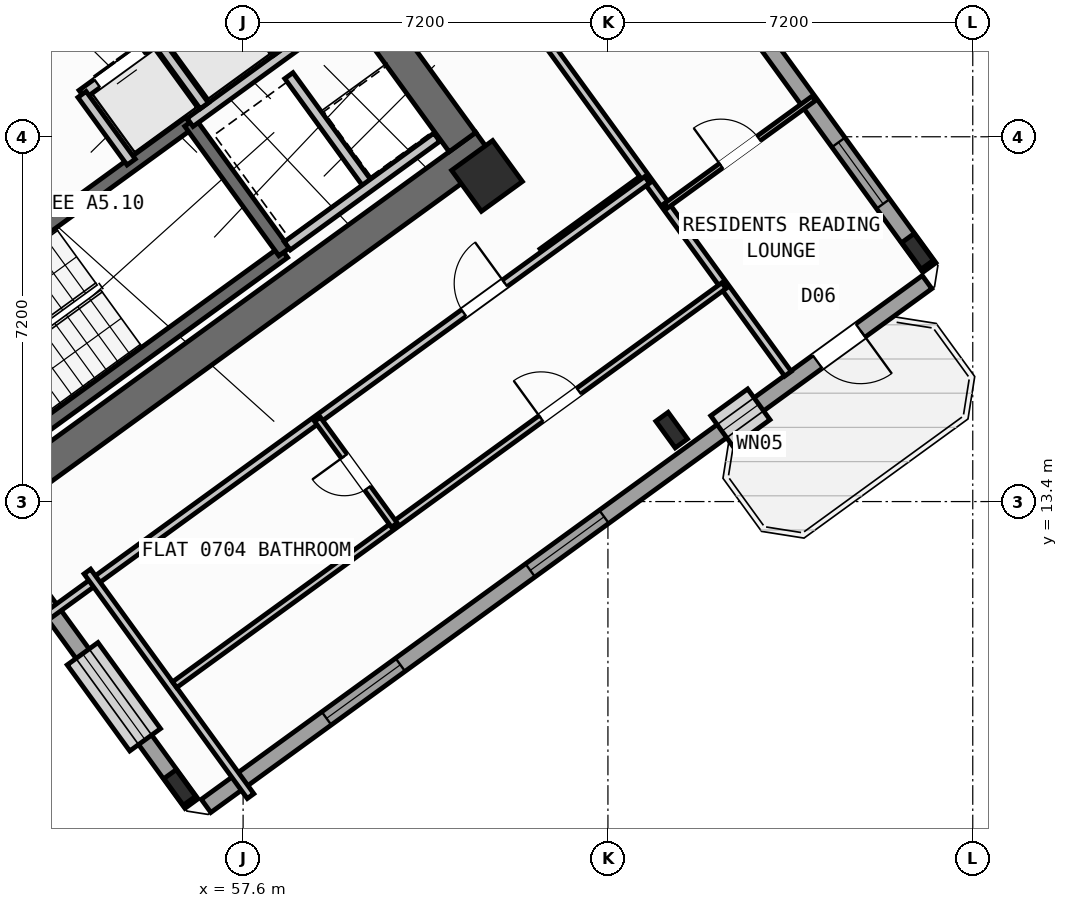
"""IFC4 building model, lengths in metres.
Left out: names, types, materials, properties, quantities, classifications, styles, units other than length and angle.
Written with IfcOpenShell. Run it as: python <this file> out.ifc"""

import sys

from ifc_helpers import new_model, si_unit, direction, frame, frame_2d, origin, origin_2d, place, context, subcontext, project, spatial, rectangle, hollow_rectangle, i_section, extrude, source, transform, mapped, element, fill, save


model = new_model("IFC4")
c1 = context("Model", 3, precision=1e-05, world=origin(), true_north=direction((0.0, 1.0)))
c2 = subcontext(c1, "Body", "Model", "MODEL_VIEW")
j1 = project(units=[si_unit("LENGTHUNIT", "METRE"), si_unit("PLANEANGLEUNIT", "RADIAN")], contexts=[c1])
p1 = place(None, origin())
s1 = spatial("IfcSite", under=j1, at=p1, CompositionType="ELEMENT")
p2 = place(p1, origin())
s2 = spatial("IfcBuilding", under=s1, at=p2, CompositionType="ELEMENT")
p3 = place(p2, frame((0.0, 0.0, 31.2)))
s3 = spatial("IfcBuildingStorey", under=s2, at=p3, CompositionType="ELEMENT", Elevation=31.2)
p4 = place(p3, frame((52.318, 13.11, 0.0), z_axis=(0.0, 0.0, 1.0), x_axis=(0.809019445368, 0.587781878776, 0.0)))
e1 = element("IfcWall", 1, at=p4, inside=s3, PredefinedType="SHEAR", context=c2, shape_type="SweptSolid", body=[
    extrude(rectangle(XDim=12.44, YDim=0.65, at=frame_2d((6.22, 0.0))), origin(), (0.0, 0.0, 1.0), 3.35),
])
p5 = place(p3, frame((61.929, 20.494, 0.0), z_axis=(0.0, 0.0, 1.0), x_axis=(-0.58782982593, 0.808984607855, 0.0)))
e2 = element("IfcWall", 2, at=p5, inside=s3, PredefinedType="SHEAR", context=c2, shape_type="SweptSolid", body=[
    extrude(rectangle(XDim=3.525, YDim=0.65, at=frame_2d((1.762, 0.0))), origin(), (0.0, 0.0, 1.0), 3.35),
])
m1 = source(origin(), c2, "Body", "SweptSolid", [
    extrude(i_section(OverallWidth=0.3, OverallDepth=0.65, WebThickness=0.016, FlangeThickness=0.031, at=origin_2d()), origin(), (0.0, 0.0, 1.0), 3.6),
])
for number, where, z_axis, x_axis in (
    (3, (56.35, 7.758, 0.0), (0.0, 0.0, 1.0), (0.809, 0.588, 0.0)),
    (4, (66.058, 14.811, 0.0), (0.0, 0.0, 1.0), (0.809, 0.588, 0.0)),
):
    element("IfcColumn", number, at=place(p3, frame(where, z_axis=z_axis, x_axis=x_axis)), inside=s3, PredefinedType="COLUMN", context=c2, shape_type="MappedRepresentation", body=[
        mapped(m1, transform((0.0, 0.0, 0.0), scale=1.0)),
    ])
m2 = source(origin(), c2, "Body", "SweptSolid", [
    extrude(hollow_rectangle(XDim=1.0, YDim=1.0, WallThickness=0.04, at=origin_2d()), origin(), (0.0, 0.0, 1.0), 3.6),
])
p6 = place(p3, frame((62.414, 19.827, 0.0), z_axis=(0.0, 0.0, 1.0), x_axis=(0.809016994375, 0.587785252292, 0.0)))
e5 = element("IfcColumn", 5, at=p6, inside=s3, PredefinedType="COLUMN", context=c2, shape_type="MappedRepresentation", body=[
    mapped(m2, transform((0.0, 0.0, 0.0), scale=1.0)),
])
p7 = place(p3, frame((70.912, 18.338, 0.0), z_axis=(0.0, 0.0, 1.0), x_axis=(0.809016994375, 0.587785252292, 0.0)))
e6 = element("IfcColumn", 6, at=p7, inside=s3, PredefinedType="COLUMN", context=c2, shape_type="MappedRepresentation", body=[
    mapped(m1, transform((0.0, 0.0, 0.0), scale=1.0)),
])
p8 = place(p3, frame((58.455, 35.484, 0.0), z_axis=(0.0, 0.0, 1.0), x_axis=(0.587783625747, -0.809018176127, 0.0)))
e7 = element("IfcWall", 7, at=p8, inside=s3, PredefinedType="STANDARD", context=c2, shape_type="SweptSolid", body=[
    extrude(rectangle(XDim=21.587, YDim=0.32, at=frame_2d((10.794, 0.0))), origin(), (0.0, 0.0, 1.0), 2.725),
])
p9 = place(p8, frame((2.994, 0.0, 0.8)))
e8 = element("IfcOpeningElement", 8, at=p9, cuts=e7, PredefinedType="OPENING", context=c2, shape_type="SweptSolid", body=[
    extrude(rectangle(XDim=2.1, YDim=1.55, at=frame_2d((1.05, 0.775))), frame((0.0, 0.17, 0.0), z_axis=(0.0, -1.0, 0.0), x_axis=(1.0, 0.0, 0.0)), (0.0, 0.0, 1.0), 0.34),
])
p10 = place(p8, frame((11.934, 0.0, 0.85)))
e9 = element("IfcOpeningElement", 9, at=p10, cuts=e7, PredefinedType="OPENING", context=c2, shape_type="SweptSolid", body=[
    extrude(rectangle(XDim=1.8, YDim=1.5, at=frame_2d((0.9, 0.75))), frame((0.0, 0.17, 0.0), z_axis=(0.0, -1.0, 0.0), x_axis=(1.0, 0.0, 0.0)), (0.0, 0.0, 1.0), 0.34),
])
p11 = place(p8, frame((18.535, 0.0, 0.85)))
e10 = element("IfcOpeningElement", 10, at=p11, cuts=e7, PredefinedType="OPENING", context=c2, shape_type="SweptSolid", body=[
    extrude(rectangle(XDim=1.5, YDim=1.5, at=frame_2d((0.75, 0.75))), frame((0.0, 0.17, 0.0), z_axis=(0.0, -1.0, 0.0), x_axis=(1.0, 0.0, 0.0)), (0.0, 0.0, 1.0), 0.34),
])
p12 = place(p3, frame((71.098, 17.731, 0.0), z_axis=(0.0, 0.0, 1.0), x_axis=(-0.809021120468, -0.587779573171, 0.0)))
e11 = element("IfcWall", 11, at=p12, inside=s3, PredefinedType="STANDARD", context=c2, shape_type="SweptSolid", body=[
    extrude(rectangle(XDim=17.588, YDim=0.32, at=frame_2d((8.794, 0.0))), origin(), (0.0, 0.0, 1.0), 3.35),
])
p13 = place(p12, frame((1.624, 0.0, 0.0)))
e12 = element("IfcOpeningElement", 12, at=p13, cuts=e11, PredefinedType="OPENING", context=c2, shape_type="SweptSolid", body=[
    extrude(rectangle(XDim=1.05, YDim=2.15, at=frame_2d((0.525, 1.075))), frame((0.0, 0.17, 0.0), z_axis=(0.0, -1.0, 0.0), x_axis=(1.0, 0.0, 0.0)), (0.0, 0.0, 1.0), 0.34),
])
p14 = place(p12, frame((4.104, 0.0, 1.0)))
e13 = element("IfcOpeningElement", 13, at=p14, cuts=e11, PredefinedType="OPENING", context=c2, shape_type="SweptSolid", body=[
    extrude(rectangle(XDim=0.9, YDim=1.25, at=frame_2d((0.45, 0.625))), frame((0.0, 0.17, 0.0), z_axis=(0.0, -1.0, 0.0), x_axis=(1.0, 0.0, 0.0)), (0.0, 0.0, 1.0), 0.34),
])
p15 = place(p12, frame((7.879, 0.0, 0.85)))
e14 = element("IfcOpeningElement", 14, at=p15, cuts=e11, PredefinedType="OPENING", context=c2, shape_type="SweptSolid", body=[
    extrude(rectangle(XDim=1.8, YDim=1.5, at=frame_2d((0.9, 0.75))), frame((0.0, 0.17, 0.0), z_axis=(0.0, -1.0, 0.0), x_axis=(1.0, 0.0, 0.0)), (0.0, 0.0, 1.0), 0.34),
])
p16 = place(p12, frame((12.849, 0.0, 0.85)))
e15 = element("IfcOpeningElement", 15, at=p16, cuts=e11, PredefinedType="OPENING", context=c2, shape_type="SweptSolid", body=[
    extrude(rectangle(XDim=1.8, YDim=1.5, at=frame_2d((0.9, 0.75))), frame((0.0, 0.17, 0.0), z_axis=(0.0, -1.0, 0.0), x_axis=(1.0, 0.0, 0.0)), (0.0, 0.0, 1.0), 0.34),
])
p17 = place(p3, frame((56.581, 7.439, 0.0), z_axis=(0.0, 0.0, 1.0), x_axis=(-0.587785875463, 0.809016541614, 0.0)))
e16 = element("IfcWall", 16, at=p17, inside=s3, PredefinedType="STANDARD", context=c2, shape_type="SweptSolid", body=[
    extrude(rectangle(XDim=6.774, YDim=0.32, at=frame_2d((3.387, 0.0))), origin(), (0.0, 0.0, 1.0), 2.725),
])
p18 = place(p17, frame((1.556, 0.0, 0.8)))
e17 = element("IfcOpeningElement", 17, at=p18, cuts=e16, PredefinedType="OPENING", context=c2, shape_type="SweptSolid", body=[
    extrude(rectangle(XDim=2.1, YDim=1.55, at=frame_2d((1.05, 0.775))), frame((0.0, 0.17, 0.0), z_axis=(0.0, -1.0, 0.0), x_axis=(1.0, 0.0, 0.0)), (0.0, 0.0, 1.0), 0.34),
])
p19 = place(p3, frame((52.472, 14.013, 0.0), z_axis=(0.0, 0.0, 1.0), x_axis=(0.809028366311, 0.587769599847, 0.0)))
e18 = element("IfcWall", 18, at=p19, inside=s3, PredefinedType="SHEAR", context=c2, shape_type="SweptSolid", body=[
    extrude(rectangle(XDim=7.33, YDim=0.26, at=frame_2d((3.665, 0.0))), origin(), (0.0, 0.0, 1.0), 3.35),
])
p20 = place(p3, frame((50.615, 16.57, 0.0), z_axis=(0.0, 0.0, 1.0), x_axis=(0.809028366311, 0.587769599847, 0.0)))
e19 = element("IfcWall", 19, at=p20, inside=s3, PredefinedType="SHEAR", context=c2, shape_type="SweptSolid", body=[
    extrude(rectangle(XDim=7.33, YDim=0.26, at=frame_2d((3.665, 0.0))), origin(), (0.0, 0.0, 1.0), 3.35),
])
p21 = place(p20, frame((0.22, 0.0, 0.0)))
e20 = element("IfcOpeningElement", 20, at=p21, cuts=e19, PredefinedType="OPENING", context=c2, shape_type="SweptSolid", body=[
    extrude(rectangle(XDim=1.1, YDim=2.1, at=frame_2d((0.55, 1.05))), frame((0.0, 0.14, 0.0), z_axis=(0.0, -1.0, 0.0), x_axis=(1.0, 0.0, 0.0)), (0.0, 0.0, 1.0), 0.28),
])
p22 = place(p3, frame((58.41, 18.327, 0.0), z_axis=(0.0, 0.0, 1.0), x_axis=(-0.58776738483, 0.809029975545, 0.0)))
e21 = element("IfcWall", 21, at=p22, inside=s3, PredefinedType="SHEAR", context=c2, shape_type="SweptSolid", body=[
    extrude(rectangle(XDim=3.16, YDim=0.26, at=frame_2d((1.58, 0.0))), origin(), (0.0, 0.0, 1.0), 3.35),
])
p23 = place(p3, frame((56.553, 20.884, 0.0), z_axis=(0.0, 0.0, 1.0), x_axis=(0.809035789462, 0.587759382205, 0.0)))
e22 = element("IfcWall", 22, at=p23, inside=s3, PredefinedType="STANDARD", context=c2, shape_type="SweptSolid", body=[
    extrude(rectangle(XDim=3.768, YDim=0.2, at=frame_2d((1.884, 0.0))), origin(), (0.0, 0.0, 1.0), 3.34),
])
p24 = place(p23, frame((2.65, 0.0, 0.0)))
e23 = element("IfcOpeningElement", 23, at=p24, cuts=e22, PredefinedType="OPENING", context=c2, shape_type="SweptSolid", body=[
    extrude(rectangle(XDim=0.86, YDim=2.05, at=frame_2d((0.43, 1.025))), frame((0.0, 0.11, 0.0), z_axis=(0.0, -1.0, 0.0), x_axis=(1.0, 0.0, 0.0)), (0.0, 0.0, 1.0), 0.22),
])
p25 = place(p3, frame((54.421, 21.436, 0.0), z_axis=(0.0, 0.0, 1.0), x_axis=(0.809013710463, 0.587789772183, 0.0)))
e24 = element("IfcWall", 24, at=p25, inside=s3, PredefinedType="STANDARD", context=c2, shape_type="SweptSolid", body=[
    extrude(rectangle(XDim=5.36, YDim=0.2, at=frame_2d((2.68, 0.0))), origin(), (0.0, 0.0, 1.0), 3.34),
])
p26 = place(p25, frame((0.37, 0.0, 0.0)))
e25 = element("IfcOpeningElement", 25, at=p26, cuts=e24, PredefinedType="OPENING", context=c2, shape_type="SweptSolid", body=[
    extrude(rectangle(XDim=1.1, YDim=2.15, at=frame_2d((0.55, 1.075))), frame((0.0, 0.11, 0.0), z_axis=(0.0, -1.0, 0.0), x_axis=(1.0, 0.0, 0.0)), (0.0, 0.0, 1.0), 0.22),
])
p27 = place(p25, frame((2.17, 0.0, 0.0)))
e26 = element("IfcOpeningElement", 26, at=p27, cuts=e24, PredefinedType="OPENING", context=c2, shape_type="SweptSolid", body=[
    extrude(rectangle(XDim=1.1, YDim=2.15, at=frame_2d((0.55, 1.075))), frame((0.0, 0.11, 0.0), z_axis=(0.0, -1.0, 0.0), x_axis=(1.0, 0.0, 0.0)), (0.0, 0.0, 1.0), 0.22),
])
p28 = place(p25, frame((3.97, 0.0, 0.0)))
e27 = element("IfcOpeningElement", 27, at=p28, cuts=e24, PredefinedType="OPENING", context=c2, shape_type="SweptSolid", body=[
    extrude(rectangle(XDim=1.1, YDim=2.15, at=frame_2d((0.55, 1.075))), frame((0.0, 0.11, 0.0), z_axis=(0.0, -1.0, 0.0), x_axis=(1.0, 0.0, 0.0)), (0.0, 0.0, 1.0), 0.22),
])
p29 = place(p3, frame((55.391, 20.102, 0.0), z_axis=(0.0, 0.0, 1.0), x_axis=(-0.58778447739, 0.809017557374, 0.0)))
e28 = element("IfcWall", 28, at=p29, inside=s3, PredefinedType="STANDARD", context=c2, shape_type="SweptSolid", body=[
    extrude(rectangle(XDim=1.65, YDim=0.2, at=frame_2d((0.825, 0.0))), origin(), (0.0, 0.0, 1.0), 3.34),
])
p30 = place(p3, frame((56.834, 21.212, 0.0), z_axis=(0.0, 0.0, 1.0), x_axis=(-0.58776738483, 0.809029975545, 0.0)))
e29 = element("IfcWall", 29, at=p30, inside=s3, PredefinedType="STANDARD", context=c2, shape_type="SweptSolid", body=[
    extrude(rectangle(XDim=1.58, YDim=0.2, at=frame_2d((0.79, 0.0))), origin(), (0.0, 0.0, 1.0), 3.34),
])
p31 = place(p3, frame((58.29, 22.27, 0.0), z_axis=(0.0, 0.0, 1.0), x_axis=(-0.587840865826, 0.808976585857, 0.0)))
e30 = element("IfcWall", 30, at=p31, inside=s3, PredefinedType="STANDARD", context=c2, shape_type="SweptSolid", body=[
    extrude(rectangle(XDim=1.58, YDim=0.2, at=frame_2d((0.79, 0.0))), origin(), (0.0, 0.0, 1.0), 3.34),
])
p32 = place(p3, frame((60.067, 19.655, 0.0), z_axis=(0.0, 0.0, 1.0), x_axis=(-0.587800520745, 0.809005900975, 0.0)))
e31 = element("IfcWall", 31, at=p32, inside=s3, PredefinedType="STANDARD", context=c2, shape_type="SweptSolid", body=[
    extrude(rectangle(XDim=2.66, YDim=0.2, at=frame_2d((1.33, 0.0))), origin(), (0.0, 0.0, 1.0), 3.34),
])
p33 = place(p3, frame((58.472, 18.447, 0.0), z_axis=(0.0, 0.0, 1.0), x_axis=(0.809022487728, 0.587777691266, 0.0)))
e32 = element("IfcWall", 32, at=p33, inside=s3, PredefinedType="STANDARD", context=c2, shape_type="SweptSolid", body=[
    extrude(rectangle(XDim=3.648, YDim=0.2, at=frame_2d((1.824, 0.0))), origin(), (0.0, 0.0, 1.0), 3.34),
])
p34 = place(p3, frame((63.507, 18.322, 0.0), z_axis=(0.0, 0.0, 1.0), x_axis=(0.809034604122, 0.587761013791, 0.0)))
e33 = element("IfcWall", 33, at=p34, inside=s3, PredefinedType="PARTITIONING", context=c2, shape_type="SweptSolid", body=[
    extrude(rectangle(XDim=2.51, YDim=0.16, at=frame_2d((1.255, 0.0))), origin(), (0.0, 0.0, 1.0), 3.34),
])
p35 = place(p3, frame((68.353, 15.922, 0.0), z_axis=(0.0, 0.0, 1.0), x_axis=(-0.587783168305, 0.809018508476, 0.0)))
e34 = element("IfcWall", 34, at=p35, inside=s3, PredefinedType="PARTITIONING", context=c2, shape_type="SweptSolid", body=[
    extrude(rectangle(XDim=10.65, YDim=0.16, at=frame_2d((5.325, 0.0))), origin(), (0.0, 0.0, 1.0), 3.34),
])
p36 = place(p3, frame((65.944, 19.238, 0.0), z_axis=(0.0, 0.0, 1.0), x_axis=(0.809013833588, 0.587789602718, 0.0)))
e35 = element("IfcWall", 35, at=p36, inside=s3, PredefinedType="PARTITIONING", context=c2, shape_type="SweptSolid", body=[
    extrude(rectangle(XDim=3.61, YDim=0.11, at=frame_2d((1.805, 0.0))), origin(), (0.0, 0.0, 1.0), 3.34),
])
p37 = place(p36, frame((1.345, 0.0, 0.0)))
e36 = element("IfcOpeningElement", 36, at=p37, cuts=e35, PredefinedType="OPENING", context=c2, shape_type="SweptSolid", body=[
    extrude(rectangle(XDim=0.92, YDim=2.08, at=frame_2d((0.46, 1.04))), frame((0.0, 0.065, 0.0), z_axis=(0.0, -1.0, 0.0), x_axis=(1.0, 0.0, 0.0)), (0.0, 0.0, 1.0), 0.13),
])
p38 = place(p3, frame((53.705, 11.126, 0.0), z_axis=(0.0, 0.0, 1.0), x_axis=(0.809014504436, 0.587788679384, 0.0)))
e37 = element("IfcWall", 37, at=p38, inside=s3, PredefinedType="PARTITIONING", context=c2, shape_type="SweptSolid", body=[
    extrude(rectangle(XDim=14.67, YDim=0.16, at=frame_2d((7.335, 0.0))), origin(), (0.0, 0.0, 1.0), 3.34),
])
p39 = place(p38, frame((10.2, 0.0, 0.0)))
e38 = element("IfcOpeningElement", 38, at=p39, cuts=e37, PredefinedType="OPENING", context=c2, shape_type="SweptSolid", body=[
    extrude(rectangle(XDim=1.0, YDim=2.1, at=frame_2d((0.5, 1.05))), frame((0.0, 0.09, 0.0), z_axis=(0.0, -1.0, 0.0), x_axis=(1.0, 0.0, 0.0)), (0.0, 0.0, 1.0), 0.18),
])
p40 = place(p3, frame((57.747, 7.586, 0.0), z_axis=(0.0, 0.0, 1.0), x_axis=(-0.587784893399, 0.809017255126, 0.0)))
e39 = element("IfcWall", 39, at=p40, inside=s3, PredefinedType="PARTITIONING", context=c2, shape_type="SweptSolid", body=[
    extrude(rectangle(XDim=5.48, YDim=0.16, at=frame_2d((2.74, 0.0))), origin(), (0.0, 0.0, 1.0), 3.34),
])
p41 = place(p3, frame((56.249, 9.785, 0.0), z_axis=(0.0, 0.0, 1.0), x_axis=(0.809011747655, 0.587792473715, 0.0)))
e40 = element("IfcWall", 40, at=p41, inside=s3, PredefinedType="PLUMBINGWALL", context=c2, shape_type="SweptSolid", body=[
    extrude(rectangle(XDim=13.4, YDim=0.14, at=frame_2d((6.7, 0.0))), origin(), (0.0, 0.0, 1.0), 3.34),
])
p42 = place(p41, frame((8.94, 0.0, 0.0)))
e41 = element("IfcOpeningElement", 41, at=p42, cuts=e40, PredefinedType="OPENING", context=c2, shape_type="SweptSolid", body=[
    extrude(rectangle(XDim=0.92, YDim=2.08, at=frame_2d((0.46, 1.04))), frame((0.0, 0.08, 0.0), z_axis=(0.0, -1.0, 0.0), x_axis=(1.0, 0.0, 0.0)), (0.0, 0.0, 1.0), 0.16),
])
p43 = place(p3, frame((60.585, 12.936, 0.0), z_axis=(0.0, 0.0, 1.0), x_axis=(-0.587772116736, 0.809026537752, 0.0)))
e42 = element("IfcWall", 42, at=p43, inside=s3, PredefinedType="PLUMBINGWALL", context=c2, shape_type="SweptSolid", body=[
    extrude(rectangle(XDim=2.58, YDim=0.14, at=frame_2d((1.29, 0.0))), origin(), (0.0, 0.0, 1.0), 3.34),
])
p44 = place(p43, frame((0.9, 0.0, 0.0)))
e43 = element("IfcOpeningElement", 43, at=p44, cuts=e42, PredefinedType="OPENING", context=c2, shape_type="SweptSolid", body=[
    extrude(rectangle(XDim=0.78, YDim=2.05, at=frame_2d((0.39, 1.025))), frame((0.0, 0.08, 0.0), z_axis=(0.0, -1.0, 0.0), x_axis=(1.0, 0.0, 0.0)), (0.0, 0.0, 1.0), 0.16),
])
m3 = source(origin(), c2, "Body", "SweptSolid", [
    extrude(rectangle(XDim=1.05, YDim=2.15, at=frame_2d((0.525, 1.075))), frame((0.0, 0.025, 0.0), z_axis=(0.0, -1.0, 0.0), x_axis=(1.0, 0.0, 0.0)), (0.0, 0.0, 1.0), 0.05),
])
p45 = place(p13, origin())
e44 = element("IfcDoor", 44, at=p45, inside=s3, OperationType="SINGLE_SWING_LEFT", PredefinedType="DOOR", context=c2, shape_type="MappedRepresentation", body=[
    mapped(m3, transform((0.0, 0.0, 0.0), scale=1.0)),
])
fill(e12, e44)
m4 = source(origin(), c2, "Body", "SweptSolid", [
    extrude(rectangle(XDim=1.5, YDim=1.5, at=frame_2d((0.75, 0.75))), frame((0.0, 0.03, 0.0), z_axis=(0.0, -1.0, 0.0), x_axis=(1.0, 0.0, 0.0)), (0.0, 0.0, 1.0), 0.06),
])
p46 = place(p11, origin())
e45 = element("IfcWindow", 45, at=p46, inside=s3, PartitioningType="SINGLE_PANEL", PredefinedType="WINDOW", context=c2, shape_type="MappedRepresentation", body=[
    mapped(m4, transform((0.0, 0.0, 0.0), scale=1.0)),
])
fill(e10, e45)
m5 = source(origin(), c2, "Body", "SweptSolid", [
    extrude(rectangle(XDim=0.9, YDim=1.25, at=frame_2d((0.45, 0.625))), frame((0.0, 0.03, 0.0), z_axis=(0.0, -1.0, 0.0), x_axis=(1.0, 0.0, 0.0)), (0.0, 0.0, 1.0), 0.06),
])
p47 = place(p14, origin())
e46 = element("IfcWindow", 46, at=p47, inside=s3, PartitioningType="SINGLE_PANEL", PredefinedType="WINDOW", context=c2, shape_type="MappedRepresentation", body=[
    mapped(m5, transform((0.0, 0.0, 0.0), scale=1.0)),
])
fill(e13, e46)
m6 = source(origin(), c2, "Body", "SweptSolid", [
    extrude(rectangle(XDim=1.8, YDim=1.5, at=frame_2d((0.9, 0.75))), frame((0.0, 0.03, 0.0), z_axis=(0.0, -1.0, 0.0), x_axis=(1.0, 0.0, 0.0)), (0.0, 0.0, 1.0), 0.06),
])
p48 = place(p15, origin())
e47 = element("IfcWindow", 47, at=p48, inside=s3, PartitioningType="SINGLE_PANEL", PredefinedType="WINDOW", context=c2, shape_type="MappedRepresentation", body=[
    mapped(m6, transform((0.0, 0.0, 0.0), scale=1.0)),
])
fill(e14, e47)
p49 = place(p16, origin())
e48 = element("IfcWindow", 48, at=p49, inside=s3, PartitioningType="SINGLE_PANEL", PredefinedType="WINDOW", context=c2, shape_type="MappedRepresentation", body=[
    mapped(m6, transform((0.0, 0.0, 0.0), scale=1.0)),
])
fill(e15, e48)
m7 = source(origin(), c2, "Body", "SweptSolid", [
    extrude(rectangle(XDim=2.1, YDim=1.55, at=frame_2d((1.05, 0.775))), frame((0.0, 0.03, 0.0), z_axis=(0.0, -1.0, 0.0), x_axis=(1.0, 0.0, 0.0)), (0.0, 0.0, 1.0), 0.06),
])
p50 = place(p18, origin())
e49 = element("IfcWindow", 49, at=p50, inside=s3, PartitioningType="SINGLE_PANEL", PredefinedType="WINDOW", context=c2, shape_type="MappedRepresentation", body=[
    mapped(m7, transform((0.0, 0.0, 0.0), scale=1.0)),
])
fill(e17, e49)
m8 = source(origin(), c2, "Body", "SweptSolid", [
    extrude(rectangle(XDim=1.1, YDim=2.15, at=frame_2d((0.55, 1.075))), frame((0.0, 0.025, 0.0), z_axis=(0.0, -1.0, 0.0), x_axis=(1.0, 0.0, 0.0)), (0.0, 0.0, 1.0), 0.05),
])
p51 = place(p26, origin())
e50 = element("IfcDoor", 50, at=p51, inside=s3, OperationType="DOUBLE_DOOR_SLIDING", PredefinedType="DOOR", context=c2, shape_type="MappedRepresentation", body=[
    mapped(m8, transform((0.0, 0.0, 0.0), scale=1.0)),
])
fill(e25, e50)
m9 = source(origin(), c2, "Body", "SweptSolid", [
    extrude(rectangle(XDim=0.92, YDim=2.08, at=frame_2d((0.46, 1.04))), frame((0.0, 0.025, 0.0), z_axis=(0.0, -1.0, 0.0), x_axis=(1.0, 0.0, 0.0)), (0.0, 0.0, 1.0), 0.05),
])
p52 = place(p37, origin())
e51 = element("IfcDoor", 51, at=p52, inside=s3, OperationType="SINGLE_SWING_LEFT", PredefinedType="DOOR", context=c2, shape_type="MappedRepresentation", body=[
    mapped(m9, transform((0.0, 0.0, 0.0), scale=1.0)),
])
fill(e36, e51)
m10 = source(origin(), c2, "Body", "SweptSolid", [
    extrude(rectangle(XDim=1.0, YDim=2.1, at=frame_2d((0.5, 1.05))), frame((0.0, 0.025, 0.0), z_axis=(0.0, -1.0, 0.0), x_axis=(1.0, 0.0, 0.0)), (0.0, 0.0, 1.0), 0.05),
])
p53 = place(p39, origin())
e52 = element("IfcDoor", 52, at=p53, inside=s3, OperationType="SINGLE_SWING_RIGHT", PredefinedType="DOOR", context=c2, shape_type="MappedRepresentation", body=[
    mapped(m10, transform((0.0, 0.0, 0.0), scale=1.0)),
])
fill(e38, e52)
p54 = place(p42, origin())
e53 = element("IfcDoor", 53, at=p54, inside=s3, OperationType="SINGLE_SWING_LEFT", PredefinedType="DOOR", context=c2, shape_type="MappedRepresentation", body=[
    mapped(m9, transform((0.0, 0.0, 0.0), scale=1.0)),
])
fill(e41, e53)
m11 = source(origin(), c2, "Body", "SweptSolid", [
    extrude(rectangle(XDim=0.78, YDim=2.05, at=frame_2d((0.39, 1.025))), frame((0.0, 0.025, 0.0), z_axis=(0.0, -1.0, 0.0), x_axis=(1.0, 0.0, 0.0)), (0.0, 0.0, 1.0), 0.05),
])
p55 = place(p44, origin())
e54 = element("IfcDoor", 54, at=p55, inside=s3, OperationType="SINGLE_SWING_RIGHT", PredefinedType="DOOR", context=c2, shape_type="MappedRepresentation", body=[
    mapped(m11, transform((0.0, 0.0, 0.0), scale=1.0)),
])
fill(e43, e54)
save(model, sys.argv[1])
